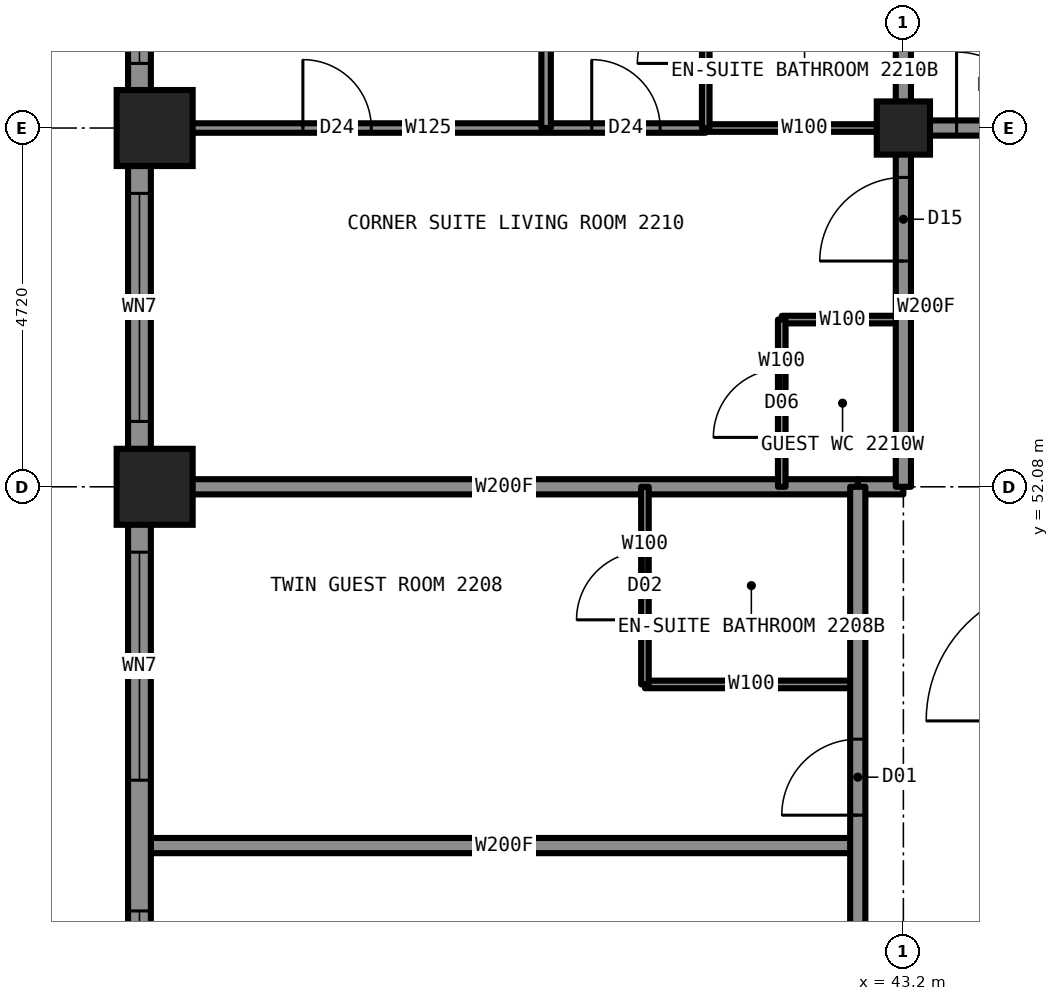
"""IFC4 building model, lengths in metres.
Left out: names, types, materials, properties, quantities, classifications, styles, units other than length and angle.
Written with IfcOpenShell. Run it as: python <this file> out.ifc"""

import sys

from ifc_helpers import new_model, si_unit, direction, frame, frame_2d, origin, origin_2d, place, context, subcontext, project, spatial, rectangle, hollow_rectangle, i_section, extrude, element, fill, save


model = new_model("IFC4")
c1 = context("Model", 3, precision=1e-05, world=origin(), true_north=direction((0.0, 1.0)))
c2 = subcontext(c1, "Body", "Model", "MODEL_VIEW")
j1 = project(units=[si_unit("LENGTHUNIT", "METRE"), si_unit("PLANEANGLEUNIT", "RADIAN")], contexts=[c1])
p1 = place(None, origin())
s1 = spatial("IfcSite", under=j1, at=p1, CompositionType="ELEMENT")
p2 = place(p1, origin())
s2 = spatial("IfcBuilding", under=s1, at=p2, CompositionType="ELEMENT")
p3 = place(p2, frame((0.0, 0.0, 81.0)))
s3 = spatial("IfcBuildingStorey", under=s2, at=p3, CompositionType="ELEMENT", Elevation=81.0)
for number, where, z_axis, x_axis in (
    (1, (33.35, 52.08, 0.0), (0.0, 0.0, 1.0), (1.0, 0.0, 0.0)),
    (2, (33.35, 56.8, 0.0), (0.0, 0.0, 1.0), (1.0, 0.0, 0.0)),
):
    element("IfcColumn", number, at=place(p3, frame(where, z_axis=z_axis, x_axis=x_axis)), inside=s3, PredefinedType="COLUMN", context=c2, shape_type="SweptSolid", body=[
        extrude(i_section(OverallWidth=0.432, OverallDepth=0.498, WebThickness=0.056, FlangeThickness=0.089, at=origin_2d()), origin(), (0.0, 0.0, 1.0), 3.5),
    ])
p4 = place(p3, frame((43.2, 56.8, 0.0), z_axis=(0.0, 0.0, 1.0), x_axis=(1.0, 0.0, 0.0)))
e3 = element("IfcColumn", 3, at=p4, inside=s3, PredefinedType="COLUMN", context=c2, shape_type="SweptSolid", body=[
    extrude(hollow_rectangle(XDim=0.7, YDim=0.7, WallThickness=0.06, at=origin_2d()), origin(), (0.0, 0.0, 1.0), 3.5),
])
p5 = place(p3, frame((40.6, 56.8, 0.0), z_axis=(0.0, 0.0, 1.0), x_axis=(1.0, 0.0, 0.0)))
e4 = element("IfcWall", 4, at=p5, inside=s3, PredefinedType="PARTITIONING", context=c2, shape_type="SweptSolid", body=[
    extrude(rectangle(XDim=2.6, YDim=0.1, at=frame_2d((1.3, 0.0))), origin(), (0.0, 0.0, 1.0), 2.573),
])
p6 = place(p3, frame((43.2, 56.8, 0.0), z_axis=(0.0, 0.0, 1.0), x_axis=(1.0, 0.0, 0.0)))
e5 = element("IfcWall", 5, at=p6, inside=s3, PredefinedType="PARTITIONING", context=c2, shape_type="SweptSolid", body=[
    extrude(rectangle(XDim=23.6, YDim=0.2, at=frame_2d((11.8, 0.0))), origin(), (0.0, 0.0, 1.0), 3.33),
])
p7 = place(p6, frame((0.7, 0.0, 0.0)))
e6 = element("IfcOpeningElement", 6, at=p7, cuts=e5, PredefinedType="OPENING", context=c2, shape_type="SweptSolid", body=[
    extrude(rectangle(XDim=1.0, YDim=2.2, at=frame_2d((0.5, 1.1))), frame((0.0, 0.11, 0.0), z_axis=(0.0, -1.0, 0.0), x_axis=(1.0, 0.0, 0.0)), (0.0, 0.0, 1.0), 0.22),
])
p8 = place(p6, frame((6.98, 0.0, 0.0)))
e7 = element("IfcOpeningElement", 7, at=p8, cuts=e5, PredefinedType="OPENING", context=c2, shape_type="SweptSolid", body=[
    extrude(rectangle(XDim=1.0, YDim=2.2, at=frame_2d((0.5, 1.1))), frame((0.0, 0.11, 0.0), z_axis=(0.0, -1.0, 0.0), x_axis=(1.0, 0.0, 0.0)), (0.0, 0.0, 1.0), 0.22),
])
p9 = place(p6, frame((11.29, 0.0, 0.0)))
e8 = element("IfcOpeningElement", 8, at=p9, cuts=e5, PredefinedType="OPENING", context=c2, shape_type="SweptSolid", body=[
    extrude(rectangle(XDim=1.1, YDim=2.2, at=frame_2d((0.55, 1.1))), frame((0.0, 0.11, 0.0), z_axis=(0.0, -1.0, 0.0), x_axis=(1.0, 0.0, 0.0)), (0.0, 0.0, 1.0), 0.22),
])
p10 = place(p3, frame((33.3, 56.8, 0.0), z_axis=(0.0, 0.0, 1.0), x_axis=(1.0, 0.0, 0.0)))
e9 = element("IfcWall", 9, at=p10, inside=s3, PredefinedType="PARTITIONING", context=c2, shape_type="SweptSolid", body=[
    extrude(rectangle(XDim=7.3, YDim=0.125, at=frame_2d((3.65, 0.0))), origin(), (0.0, 0.0, 1.0), 2.573),
])
p11 = place(p10, frame((5.8, 0.0, 0.0)))
e10 = element("IfcOpeningElement", 10, at=p11, cuts=e9, PredefinedType="OPENING", context=c2, shape_type="SweptSolid", body=[
    extrude(rectangle(XDim=0.9, YDim=2.2, at=frame_2d((0.45, 1.1))), frame((0.0, 0.073, 0.0), z_axis=(0.0, -1.0, 0.0), x_axis=(1.0, 0.0, 0.0)), (0.0, 0.0, 1.0), 0.145),
])
p12 = place(p10, frame((2.0, 0.0, 0.0)))
e11 = element("IfcOpeningElement", 11, at=p12, cuts=e9, PredefinedType="OPENING", context=c2, shape_type="SweptSolid", body=[
    extrude(rectangle(XDim=0.9, YDim=2.2, at=frame_2d((0.45, 1.1))), frame((0.0, 0.073, 0.0), z_axis=(0.0, -1.0, 0.0), x_axis=(1.0, 0.0, 0.0)), (0.0, 0.0, 1.0), 0.145),
])
p13 = place(p3, frame((33.3, 47.36, 0.0), z_axis=(0.0, 0.0, 1.0), x_axis=(1.0, 0.0, 0.0)))
e12 = element("IfcWall", 12, at=p13, inside=s3, PredefinedType="PARTITIONING", context=c2, shape_type="SweptSolid", body=[
    extrude(rectangle(XDim=9.3, YDim=0.2, at=frame_2d((4.65, 0.0))), origin(), (0.0, 0.0, 1.0), 2.723),
])
p14 = place(p3, frame((39.8, 49.48, 0.0), z_axis=(0.0, 0.0, 1.0), x_axis=(1.0, 0.0, 0.0)))
e13 = element("IfcWall", 13, at=p14, inside=s3, PredefinedType="PARTITIONING", context=c2, shape_type="SweptSolid", body=[
    extrude(rectangle(XDim=2.8, YDim=0.1, at=frame_2d((1.4, 0.0))), origin(), (0.0, 0.0, 1.0), 3.33),
])
p15 = place(p3, frame((42.6, 52.08, 0.0), z_axis=(0.0, 0.0, 1.0), x_axis=(1.0, 0.0, 0.0)))
e14 = element("IfcWall", 14, at=p15, inside=s3, PredefinedType="PARTITIONING", context=c2, shape_type="SweptSolid", body=[
    extrude(rectangle(XDim=0.6, YDim=0.2, at=frame_2d((0.3, 0.0))), origin(), (0.0, 0.0, 1.0), 2.573),
])
p16 = place(p3, frame((33.3, 52.08, 0.0), z_axis=(0.0, 0.0, 1.0), x_axis=(1.0, 0.0, 0.0)))
e15 = element("IfcWall", 15, at=p16, inside=s3, PredefinedType="PARTITIONING", context=c2, shape_type="SweptSolid", body=[
    extrude(rectangle(XDim=9.3, YDim=0.2, at=frame_2d((4.65, 0.0))), origin(), (0.0, 0.0, 1.0), 2.573),
])
p17 = place(p3, frame((41.6, 54.28, 0.0), z_axis=(0.0, 0.0, 1.0), x_axis=(1.0, 0.0, 0.0)))
e16 = element("IfcWall", 16, at=p17, inside=s3, PredefinedType="PARTITIONING", context=c2, shape_type="SweptSolid", body=[
    extrude(rectangle(XDim=1.6, YDim=0.1, at=frame_2d((0.8, 0.0))), origin(), (0.0, 0.0, 1.0), 2.723),
])
p18 = place(p3, frame((43.2, 52.08, 0.0), z_axis=(0.0, 0.0, 1.0), x_axis=(0.0, 1.0, 0.0)))
e17 = element("IfcWall", 17, at=p18, inside=s3, PredefinedType="PARTITIONING", context=c2, shape_type="SweptSolid", body=[
    extrude(rectangle(XDim=4.72, YDim=0.2, at=frame_2d((2.36, 0.0))), origin(), (0.0, 0.0, 1.0), 3.33),
])
p19 = place(p18, frame((2.97, 0.0, 0.0)))
e18 = element("IfcOpeningElement", 18, at=p19, cuts=e17, PredefinedType="OPENING", context=c2, shape_type="SweptSolid", body=[
    extrude(rectangle(XDim=1.1, YDim=2.2, at=frame_2d((0.55, 1.1))), frame((0.0, 0.11, 0.0), z_axis=(0.0, -1.0, 0.0), x_axis=(1.0, 0.0, 0.0)), (0.0, 0.0, 1.0), 0.22),
])
p20 = place(p3, frame((43.2, 56.8, 0.0), z_axis=(0.0, 0.0, 1.0), x_axis=(0.0, 1.0, 0.0)))
e19 = element("IfcWall", 19, at=p20, inside=s3, PredefinedType="PARTITIONING", context=c2, shape_type="SweptSolid", body=[
    extrude(rectangle(XDim=9.9, YDim=0.2, at=frame_2d((4.95, 0.0))), origin(), (0.0, 0.0, 1.0), 2.573),
])
p21 = place(p3, frame((42.6, 37.92, 0.0), z_axis=(0.0, 0.0, 1.0), x_axis=(0.0, 1.0, 0.0)))
e20 = element("IfcWall", 20, at=p21, inside=s3, PredefinedType="PARTITIONING", context=c2, shape_type="SweptSolid", body=[
    extrude(rectangle(XDim=14.16, YDim=0.2, at=frame_2d((7.08, 0.0))), origin(), (0.0, 0.0, 1.0), 3.33),
])
p22 = place(p21, frame((9.84, 0.0, 0.0)))
e21 = element("IfcOpeningElement", 21, at=p22, cuts=e20, PredefinedType="OPENING", context=c2, shape_type="SweptSolid", body=[
    extrude(rectangle(XDim=1.0, YDim=2.2, at=frame_2d((0.5, 1.1))), frame((0.0, 0.11, 0.0), z_axis=(0.0, -1.0, 0.0), x_axis=(1.0, 0.0, 0.0)), (0.0, 0.0, 1.0), 0.22),
])
p23 = place(p21, frame((2.75, 0.0, 0.0)))
e22 = element("IfcOpeningElement", 22, at=p23, cuts=e20, PredefinedType="OPENING", context=c2, shape_type="SweptSolid", body=[
    extrude(rectangle(XDim=2.0, YDim=2.4, at=frame_2d((1.0, 1.2))), frame((0.0, 0.11, 0.0), z_axis=(0.0, -1.0, 0.0), x_axis=(1.0, 0.0, 0.0)), (0.0, 0.0, 1.0), 0.22),
])
p24 = place(p21, frame((0.7, 0.0, 0.0)))
e23 = element("IfcOpeningElement", 23, at=p24, cuts=e20, PredefinedType="OPENING", context=c2, shape_type="SweptSolid", body=[
    extrude(rectangle(XDim=1.0, YDim=2.1, at=frame_2d((0.5, 1.05))), frame((0.0, 0.11, 0.0), z_axis=(0.0, -1.0, 0.0), x_axis=(1.0, 0.0, 0.0)), (0.0, 0.0, 1.0), 0.22),
])
p25 = place(p3, frame((41.6, 52.08, 0.0), z_axis=(0.0, 0.0, 1.0), x_axis=(0.0, 1.0, 0.0)))
e24 = element("IfcWall", 24, at=p25, inside=s3, PredefinedType="PARTITIONING", context=c2, shape_type="SweptSolid", body=[
    extrude(rectangle(XDim=2.2, YDim=0.1, at=frame_2d((1.1, 0.0))), origin(), (0.0, 0.0, 1.0), 3.33),
])
p26 = place(p25, frame((0.65, 0.0, 0.0)))
e25 = element("IfcOpeningElement", 25, at=p26, cuts=e24, PredefinedType="OPENING", context=c2, shape_type="SweptSolid", body=[
    extrude(rectangle(XDim=0.9, YDim=2.1, at=frame_2d((0.45, 1.05))), frame((0.0, 0.06, 0.0), z_axis=(0.0, -1.0, 0.0), x_axis=(1.0, 0.0, 0.0)), (0.0, 0.0, 1.0), 0.12),
])
p27 = place(p3, frame((40.6, 56.8, 0.0), z_axis=(0.0, 0.0, 1.0), x_axis=(0.0, 1.0, 0.0)))
e26 = element("IfcWall", 26, at=p27, inside=s3, PredefinedType="PARTITIONING", context=c2, shape_type="SweptSolid", body=[
    extrude(rectangle(XDim=2.6, YDim=0.1, at=frame_2d((1.3, 0.0))), origin(), (0.0, 0.0, 1.0), 3.33),
])
p28 = place(p27, frame((0.85, 0.0, 0.0)))
e27 = element("IfcOpeningElement", 27, at=p28, cuts=e26, PredefinedType="OPENING", context=c2, shape_type="SweptSolid", body=[
    extrude(rectangle(XDim=0.9, YDim=2.1, at=frame_2d((0.45, 1.05))), frame((0.0, 0.06, 0.0), z_axis=(0.0, -1.0, 0.0), x_axis=(1.0, 0.0, 0.0)), (0.0, 0.0, 1.0), 0.12),
])
p29 = place(p3, frame((39.8, 49.48, 0.0), z_axis=(0.0, 0.0, 1.0), x_axis=(0.0, 1.0, 0.0)))
e28 = element("IfcWall", 28, at=p29, inside=s3, PredefinedType="PARTITIONING", context=c2, shape_type="SweptSolid", body=[
    extrude(rectangle(XDim=2.6, YDim=0.1, at=frame_2d((1.3, 0.0))), origin(), (0.0, 0.0, 1.0), 3.33),
])
p30 = place(p29, frame((0.85, 0.0, 0.0)))
e29 = element("IfcOpeningElement", 29, at=p30, cuts=e28, PredefinedType="OPENING", context=c2, shape_type="SweptSolid", body=[
    extrude(rectangle(XDim=0.9, YDim=2.1, at=frame_2d((0.45, 1.05))), frame((0.0, 0.06, 0.0), z_axis=(0.0, -1.0, 0.0), x_axis=(1.0, 0.0, 0.0)), (0.0, 0.0, 1.0), 0.12),
])
p31 = place(p3, frame((38.5, 56.8, 0.0), z_axis=(0.0, 0.0, 1.0), x_axis=(0.0, 1.0, 0.0)))
e30 = element("IfcWall", 30, at=p31, inside=s3, PredefinedType="PARTITIONING", context=c2, shape_type="SweptSolid", body=[
    extrude(rectangle(XDim=9.894, YDim=0.125, at=frame_2d((4.947, 0.0))), origin(), (0.0, 0.0, 1.0), 3.33),
])
p32 = place(p3, frame((33.15, 61.5, 0.0), z_axis=(0.0, 0.0, 1.0), x_axis=(0.0, -1.0, 0.0)))
e31 = element("IfcWall", 31, at=p32, inside=s3, PredefinedType="SOLIDWALL", context=c2, shape_type="SweptSolid", body=[
    extrude(rectangle(XDim=33.0, YDim=0.3, at=frame_2d((16.5, 0.0))), origin(), (0.0, 0.0, 1.0), 2.63),
])
p33 = place(p32, frame((0.85, 0.0, 0.5)))
e32 = element("IfcOpeningElement", 32, at=p33, cuts=e31, PredefinedType="OPENING", context=c2, shape_type="SweptSolid", body=[
    extrude(rectangle(XDim=3.0, YDim=2.0, at=frame_2d((1.5, 1.0))), frame((0.0, 0.16, 0.0), z_axis=(0.0, -1.0, 0.0), x_axis=(1.0, 0.0, 0.0)), (0.0, 0.0, 1.0), 0.32),
])
p34 = place(p32, frame((5.56, 0.0, 0.5)))
e33 = element("IfcOpeningElement", 33, at=p34, cuts=e31, PredefinedType="OPENING", context=c2, shape_type="SweptSolid", body=[
    extrude(rectangle(XDim=3.0, YDim=2.0, at=frame_2d((1.5, 1.0))), frame((0.0, 0.16, 0.0), z_axis=(0.0, -1.0, 0.0), x_axis=(1.0, 0.0, 0.0)), (0.0, 0.0, 1.0), 0.32),
])
p35 = place(p32, frame((10.28, 0.0, 0.5)))
e34 = element("IfcOpeningElement", 34, at=p35, cuts=e31, PredefinedType="OPENING", context=c2, shape_type="SweptSolid", body=[
    extrude(rectangle(XDim=3.0, YDim=2.0, at=frame_2d((1.5, 1.0))), frame((0.0, 0.16, 0.0), z_axis=(0.0, -1.0, 0.0), x_axis=(1.0, 0.0, 0.0)), (0.0, 0.0, 1.0), 0.32),
])
p36 = place(p32, frame((15.0, 0.0, 0.5)))
e35 = element("IfcOpeningElement", 35, at=p36, cuts=e31, PredefinedType="OPENING", context=c2, shape_type="SweptSolid", body=[
    extrude(rectangle(XDim=3.0, YDim=2.0, at=frame_2d((1.5, 1.0))), frame((0.0, 0.16, 0.0), z_axis=(0.0, -1.0, 0.0), x_axis=(1.0, 0.0, 0.0)), (0.0, 0.0, 1.0), 0.32),
])
p37 = place(p32, frame((19.72, 0.0, 0.5)))
e36 = element("IfcOpeningElement", 36, at=p37, cuts=e31, PredefinedType="OPENING", context=c2, shape_type="SweptSolid", body=[
    extrude(rectangle(XDim=3.0, YDim=2.0, at=frame_2d((1.5, 1.0))), frame((0.0, 0.16, 0.0), z_axis=(0.0, -1.0, 0.0), x_axis=(1.0, 0.0, 0.0)), (0.0, 0.0, 1.0), 0.32),
])
p38 = place(p32, frame((24.44, 0.0, 0.5)))
e37 = element("IfcOpeningElement", 37, at=p38, cuts=e31, PredefinedType="OPENING", context=c2, shape_type="SweptSolid", body=[
    extrude(rectangle(XDim=3.0, YDim=2.0, at=frame_2d((1.5, 1.0))), frame((0.0, 0.16, 0.0), z_axis=(0.0, -1.0, 0.0), x_axis=(1.0, 0.0, 0.0)), (0.0, 0.0, 1.0), 0.32),
])
p39 = place(p32, frame((29.15, 0.0, 0.5)))
e38 = element("IfcOpeningElement", 38, at=p39, cuts=e31, PredefinedType="OPENING", context=c2, shape_type="SweptSolid", body=[
    extrude(rectangle(XDim=3.0, YDim=2.0, at=frame_2d((1.5, 1.0))), frame((0.0, 0.16, 0.0), z_axis=(0.0, -1.0, 0.0), x_axis=(1.0, 0.0, 0.0)), (0.0, 0.0, 1.0), 0.32),
])
p40 = place(p7, origin())
e39 = element("IfcDoor", 39, at=p40, inside=s3, OperationType="SINGLE_SWING_LEFT", PredefinedType="DOOR", context=c2, shape_type="SweptSolid", body=[
    extrude(rectangle(XDim=1.0, YDim=2.2, at=frame_2d((0.5, 1.1))), frame((0.0, 0.025, 0.0), z_axis=(0.0, -1.0, 0.0), x_axis=(1.0, 0.0, 0.0)), (0.0, 0.0, 1.0), 0.05),
])
fill(e6, e39)
p41 = place(p22, origin())
e40 = element("IfcDoor", 40, at=p41, inside=s3, OperationType="SINGLE_SWING_LEFT", PredefinedType="DOOR", context=c2, shape_type="SweptSolid", body=[
    extrude(rectangle(XDim=1.0, YDim=2.2, at=frame_2d((0.5, 1.1))), frame((0.0, 0.025, 0.0), z_axis=(0.0, -1.0, 0.0), x_axis=(1.0, 0.0, 0.0)), (0.0, 0.0, 1.0), 0.05),
])
fill(e21, e40)
p42 = place(p30, origin())
e41 = element("IfcDoor", 41, at=p42, inside=s3, OperationType="SINGLE_SWING_RIGHT", PredefinedType="DOOR", context=c2, shape_type="SweptSolid", body=[
    extrude(rectangle(XDim=0.9, YDim=2.1, at=frame_2d((0.45, 1.05))), frame((0.0, 0.025, 0.0), z_axis=(0.0, -1.0, 0.0), x_axis=(1.0, 0.0, 0.0)), (0.0, 0.0, 1.0), 0.05),
])
fill(e29, e41)
p43 = place(p19, origin())
e42 = element("IfcDoor", 42, at=p43, inside=s3, OperationType="SINGLE_SWING_LEFT", PredefinedType="DOOR", context=c2, shape_type="SweptSolid", body=[
    extrude(rectangle(XDim=1.1, YDim=2.2, at=frame_2d((0.55, 1.1))), frame((0.0, 0.025, 0.0), z_axis=(0.0, -1.0, 0.0), x_axis=(1.0, 0.0, 0.0)), (0.0, 0.0, 1.0), 0.05),
])
fill(e18, e42)
p44 = place(p28, origin())
e43 = element("IfcDoor", 43, at=p44, inside=s3, OperationType="SINGLE_SWING_RIGHT", PredefinedType="DOOR", context=c2, shape_type="SweptSolid", body=[
    extrude(rectangle(XDim=0.9, YDim=2.1, at=frame_2d((0.45, 1.05))), frame((0.0, 0.025, 0.0), z_axis=(0.0, -1.0, 0.0), x_axis=(1.0, 0.0, 0.0)), (0.0, 0.0, 1.0), 0.05),
])
fill(e27, e43)
p45 = place(p11, origin())
e44 = element("IfcDoor", 44, at=p45, inside=s3, OperationType="SINGLE_SWING_LEFT", PredefinedType="DOOR", context=c2, shape_type="SweptSolid", body=[
    extrude(rectangle(XDim=0.9, YDim=2.2, at=frame_2d((0.45, 1.1))), frame((0.0, 0.025, 0.0), z_axis=(0.0, -1.0, 0.0), x_axis=(1.0, 0.0, 0.0)), (0.0, 0.0, 1.0), 0.05),
])
fill(e10, e44)
p46 = place(p12, origin())
e45 = element("IfcDoor", 45, at=p46, inside=s3, OperationType="SINGLE_SWING_LEFT", PredefinedType="DOOR", context=c2, shape_type="SweptSolid", body=[
    extrude(rectangle(XDim=0.9, YDim=2.2, at=frame_2d((0.45, 1.1))), frame((0.0, 0.025, 0.0), z_axis=(0.0, -1.0, 0.0), x_axis=(1.0, 0.0, 0.0)), (0.0, 0.0, 1.0), 0.05),
])
fill(e11, e45)
p47 = place(p26, origin())
e46 = element("IfcDoor", 46, at=p47, inside=s3, OperationType="SINGLE_SWING_LEFT", PredefinedType="DOOR", context=c2, shape_type="SweptSolid", body=[
    extrude(rectangle(XDim=0.9, YDim=2.1, at=frame_2d((0.45, 1.05))), frame((0.0, 0.025, 0.0), z_axis=(0.0, -1.0, 0.0), x_axis=(1.0, 0.0, 0.0)), (0.0, 0.0, 1.0), 0.05),
])
fill(e25, e46)
p48 = place(p33, origin())
e47 = element("IfcWindow", 47, at=p48, inside=s3, PartitioningType="SINGLE_PANEL", PredefinedType="WINDOW", context=c2, shape_type="SweptSolid", body=[
    extrude(rectangle(XDim=3.0, YDim=2.0, at=frame_2d((1.5, 1.0))), frame((0.0, 0.03, 0.0), z_axis=(0.0, -1.0, 0.0), x_axis=(1.0, 0.0, 0.0)), (0.0, 0.0, 1.0), 0.06),
])
fill(e32, e47)
p49 = place(p34, origin())
e48 = element("IfcWindow", 48, at=p49, inside=s3, PartitioningType="SINGLE_PANEL", PredefinedType="WINDOW", context=c2, shape_type="SweptSolid", body=[
    extrude(rectangle(XDim=3.0, YDim=2.0, at=frame_2d((1.5, 1.0))), frame((0.0, 0.03, 0.0), z_axis=(0.0, -1.0, 0.0), x_axis=(1.0, 0.0, 0.0)), (0.0, 0.0, 1.0), 0.06),
])
fill(e33, e48)
p50 = place(p35, origin())
e49 = element("IfcWindow", 49, at=p50, inside=s3, PartitioningType="SINGLE_PANEL", PredefinedType="WINDOW", context=c2, shape_type="SweptSolid", body=[
    extrude(rectangle(XDim=3.0, YDim=2.0, at=frame_2d((1.5, 1.0))), frame((0.0, 0.03, 0.0), z_axis=(0.0, -1.0, 0.0), x_axis=(1.0, 0.0, 0.0)), (0.0, 0.0, 1.0), 0.06),
])
fill(e34, e49)
p51 = place(p36, origin())
e50 = element("IfcWindow", 50, at=p51, inside=s3, PartitioningType="SINGLE_PANEL", PredefinedType="WINDOW", context=c2, shape_type="SweptSolid", body=[
    extrude(rectangle(XDim=3.0, YDim=2.0, at=frame_2d((1.5, 1.0))), frame((0.0, 0.03, 0.0), z_axis=(0.0, -1.0, 0.0), x_axis=(1.0, 0.0, 0.0)), (0.0, 0.0, 1.0), 0.06),
])
fill(e35, e50)
save(model, sys.argv[1])
